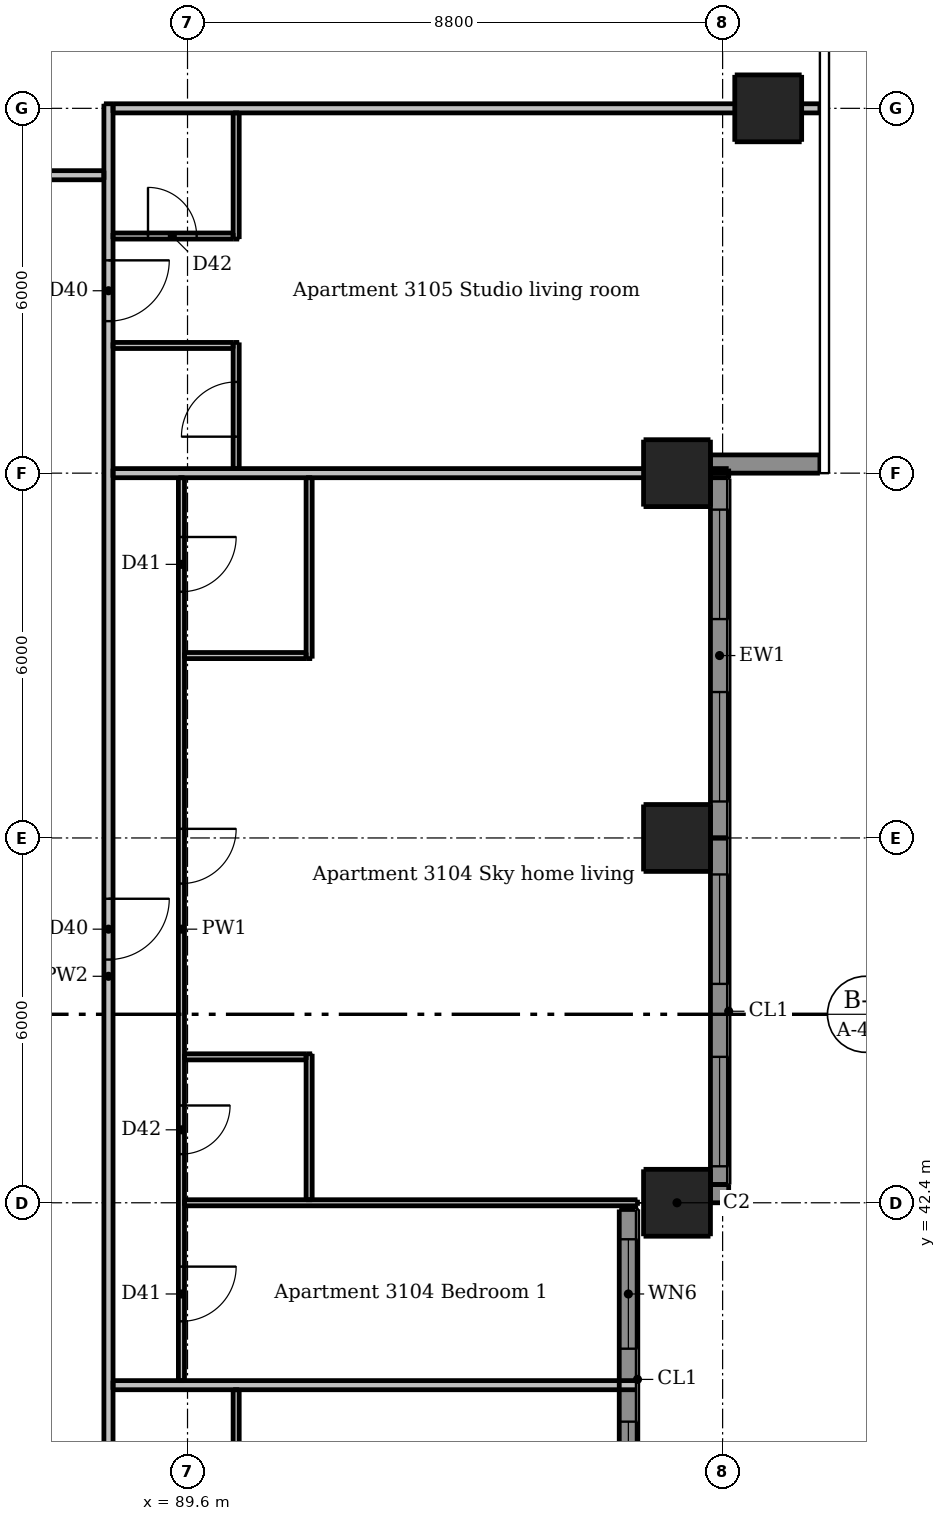
"""IFC4 building model, lengths in metres.
Left out: names, types, materials, properties, quantities, classifications, styles, units other than length and angle.
Written with IfcOpenShell. Run it as: python <this file> out.ifc"""

import sys

from ifc_helpers import new_model, si_unit, direction, frame, frame_2d, origin, origin_2d, place, context, subcontext, project, spatial, rectangle, extrude, element, fill, save


model = new_model("IFC4")
c1 = context("Model", 3, precision=1e-05, world=origin(), true_north=direction((0.0, 1.0)))
c2 = subcontext(c1, "Body", "Model", "MODEL_VIEW")
j1 = project(units=[si_unit("LENGTHUNIT", "METRE"), si_unit("PLANEANGLEUNIT", "RADIAN")], contexts=[c1])
p1 = place(None, origin())
s1 = spatial("IfcSite", under=j1, at=p1, CompositionType="ELEMENT")
p2 = place(p1, origin())
s2 = spatial("IfcBuilding", under=s1, at=p2, CompositionType="ELEMENT")
p3 = place(p2, frame((0.0, 0.0, 115.0)))
s3 = spatial("IfcBuildingStorey", under=s2, at=p3, CompositionType="ELEMENT", Elevation=115.0)
for number, where, z_axis, x_axis in (
    (1, (97.65, 42.4, 0.0), (0.0, 0.0, 1.0), (1.0, 0.0, 0.0)),
    (2, (97.65, 48.4, 0.0), (0.0, 0.0, 1.0), (1.0, 0.0, 0.0)),
    (3, (97.65, 54.4, 0.0), (0.0, 0.0, 1.0), (1.0, 0.0, 0.0)),
    (4, (99.15, 60.4, 0.0), (0.0, 0.0, 1.0), (1.0, 0.0, 0.0)),
):
    element("IfcColumn", number, at=place(p3, frame(where, z_axis=z_axis, x_axis=x_axis)), inside=s3, PredefinedType="COLUMN", context=c2, shape_type="SweptSolid", body=[
        extrude(rectangle(XDim=1.1, YDim=1.1, at=origin_2d()), origin(), (0.0, 0.0, 1.0), 3.05),
    ])
p4 = place(p3, frame((98.2, 42.55, 0.0), z_axis=(0.0, 0.0, 1.0), x_axis=(1.0, 0.0, 0.0)))
e5 = element("IfcWall", 5, at=p4, inside=s3, PredefinedType="SOLIDWALL", context=c2, shape_type="SweptSolid", body=[
    extrude(rectangle(XDim=0.3, YDim=0.3, at=frame_2d((0.15, 0.0))), origin(), (0.0, 0.0, 1.0), 3.05),
])
p5 = place(p3, frame((98.2, 54.55, 0.0), z_axis=(0.0, 0.0, 1.0), x_axis=(1.0, 0.0, 0.0)))
e6 = element("IfcWall", 6, at=p5, inside=s3, PredefinedType="SOLIDWALL", context=c2, shape_type="SweptSolid", body=[
    extrude(rectangle(XDim=1.8, YDim=0.3, at=frame_2d((0.9, 0.0))), origin(), (0.0, 0.0, 1.0), 3.05),
])
p6 = place(p3, frame((96.85, 36.7, 0.0), z_axis=(0.0, 0.0, 1.0), x_axis=(0.0, 1.0, 0.0)))
e7 = element("IfcWall", 7, at=p6, inside=s3, PredefinedType="SOLIDWALL", context=c2, shape_type="SweptSolid", body=[
    extrude(rectangle(XDim=5.59, YDim=0.3, at=frame_2d((2.795, 0.0))), origin(), (0.0, 0.0, 1.0), 3.05),
])
p7 = place(p6, frame((0.3, 0.0, 0.15)))
e8 = element("IfcOpeningElement", 8, at=p7, cuts=e7, PredefinedType="OPENING", context=c2, shape_type="SweptSolid", body=[
    extrude(rectangle(XDim=1.8, YDim=2.1, at=frame_2d((0.9, 1.05))), frame((0.0, 0.16, 0.0), z_axis=(0.0, -1.0, 0.0), x_axis=(1.0, 0.0, 0.0)), (0.0, 0.0, 1.0), 0.32),
])
p8 = place(p6, frame((3.3, 0.0, 0.15)))
e9 = element("IfcOpeningElement", 9, at=p8, cuts=e7, PredefinedType="OPENING", context=c2, shape_type="SweptSolid", body=[
    extrude(rectangle(XDim=1.8, YDim=2.1, at=frame_2d((0.9, 1.05))), frame((0.0, 0.16, 0.0), z_axis=(0.0, -1.0, 0.0), x_axis=(1.0, 0.0, 0.0)), (0.0, 0.0, 1.0), 0.32),
])
p9 = place(p3, frame((98.35, 42.7, 0.0), z_axis=(0.0, 0.0, 1.0), x_axis=(0.0, 1.0, 0.0)))
e10 = element("IfcWall", 10, at=p9, inside=s3, PredefinedType="SOLIDWALL", context=c2, shape_type="SweptSolid", body=[
    extrude(rectangle(XDim=5.7, YDim=0.3, at=frame_2d((2.85, 0.0))), origin(), (0.0, 0.0, 1.0), 3.05),
])
p10 = place(p9, frame((0.3, 0.0, 0.15)))
e11 = element("IfcOpeningElement", 11, at=p10, cuts=e10, PredefinedType="OPENING", context=c2, shape_type="SweptSolid", body=[
    extrude(rectangle(XDim=1.8, YDim=2.1, at=frame_2d((0.9, 1.05))), frame((0.0, 0.16, 0.0), z_axis=(0.0, -1.0, 0.0), x_axis=(1.0, 0.0, 0.0)), (0.0, 0.0, 1.0), 0.32),
])
p11 = place(p9, frame((3.3, 0.0, 0.15)))
e12 = element("IfcOpeningElement", 12, at=p11, cuts=e10, PredefinedType="OPENING", context=c2, shape_type="SweptSolid", body=[
    extrude(rectangle(XDim=1.8, YDim=2.1, at=frame_2d((0.9, 1.05))), frame((0.0, 0.16, 0.0), z_axis=(0.0, -1.0, 0.0), x_axis=(1.0, 0.0, 0.0)), (0.0, 0.0, 1.0), 0.32),
])
p12 = place(p3, frame((98.35, 48.4, 0.0), z_axis=(0.0, 0.0, 1.0), x_axis=(0.0, 1.0, 0.0)))
e13 = element("IfcWall", 13, at=p12, inside=s3, PredefinedType="SOLIDWALL", context=c2, shape_type="SweptSolid", body=[
    extrude(rectangle(XDim=6.0, YDim=0.3, at=frame_2d((3.0, 0.0))), origin(), (0.0, 0.0, 1.0), 3.05),
])
p13 = place(p12, frame((0.6, 0.0, 0.15)))
e14 = element("IfcOpeningElement", 14, at=p13, cuts=e13, PredefinedType="OPENING", context=c2, shape_type="SweptSolid", body=[
    extrude(rectangle(XDim=1.8, YDim=2.1, at=frame_2d((0.9, 1.05))), frame((0.0, 0.16, 0.0), z_axis=(0.0, -1.0, 0.0), x_axis=(1.0, 0.0, 0.0)), (0.0, 0.0, 1.0), 0.32),
])
p14 = place(p12, frame((3.6, 0.0, 0.15)))
e15 = element("IfcOpeningElement", 15, at=p14, cuts=e13, PredefinedType="OPENING", context=c2, shape_type="SweptSolid", body=[
    extrude(rectangle(XDim=1.8, YDim=2.1, at=frame_2d((0.9, 1.05))), frame((0.0, 0.16, 0.0), z_axis=(0.0, -1.0, 0.0), x_axis=(1.0, 0.0, 0.0)), (0.0, 0.0, 1.0), 0.32),
])
p15 = place(p3, frame((89.5, 54.325, 0.0), z_axis=(0.0, 0.0, 1.0), x_axis=(0.0, -1.0, 0.0)))
e16 = element("IfcWall", 16, at=p15, inside=s3, PredefinedType="PARTITIONING", context=c2, shape_type="SweptSolid", body=[
    extrude(rectangle(XDim=14.85, YDim=0.1, at=frame_2d((7.425, 0.0))), origin(), (0.0, 0.0, 1.0), 3.05),
])
p16 = place(p15, frame((5.775, 0.0, 0.0)))
e17 = element("IfcOpeningElement", 17, at=p16, cuts=e16, PredefinedType="OPENING", context=c2, shape_type="SweptSolid", body=[
    extrude(rectangle(XDim=0.9, YDim=2.1, at=frame_2d((0.45, 1.05))), frame((0.0, 0.06, 0.0), z_axis=(0.0, -1.0, 0.0), x_axis=(1.0, 0.0, 0.0)), (0.0, 0.0, 1.0), 0.12),
])
p17 = place(p15, frame((0.975, 0.0, 0.0)))
e18 = element("IfcOpeningElement", 18, at=p17, cuts=e16, PredefinedType="OPENING", context=c2, shape_type="SweptSolid", body=[
    extrude(rectangle(XDim=0.9, YDim=2.1, at=frame_2d((0.45, 1.05))), frame((0.0, 0.06, 0.0), z_axis=(0.0, -1.0, 0.0), x_axis=(1.0, 0.0, 0.0)), (0.0, 0.0, 1.0), 0.12),
])
p18 = place(p15, frame((12.975, 0.0, 0.0)))
e19 = element("IfcOpeningElement", 19, at=p18, cuts=e16, PredefinedType="OPENING", context=c2, shape_type="SweptSolid", body=[
    extrude(rectangle(XDim=0.9, YDim=2.1, at=frame_2d((0.45, 1.05))), frame((0.0, 0.06, 0.0), z_axis=(0.0, -1.0, 0.0), x_axis=(1.0, 0.0, 0.0)), (0.0, 0.0, 1.0), 0.12),
])
p19 = place(p15, frame((10.325, 0.0, 0.0)))
e20 = element("IfcOpeningElement", 20, at=p19, cuts=e16, PredefinedType="OPENING", context=c2, shape_type="SweptSolid", body=[
    extrude(rectangle(XDim=0.8, YDim=2.1, at=frame_2d((0.4, 1.05))), frame((0.0, 0.06, 0.0), z_axis=(0.0, -1.0, 0.0), x_axis=(1.0, 0.0, 0.0)), (0.0, 0.0, 1.0), 0.12),
])
p20 = place(p3, frame((90.4, 33.45, 0.0), z_axis=(0.0, 0.0, 1.0), x_axis=(0.0, 1.0, 0.0)))
e21 = element("IfcWall", 21, at=p20, inside=s3, PredefinedType="PARTITIONING", context=c2, shape_type="SweptSolid", body=[
    extrude(rectangle(XDim=5.875, YDim=0.1, at=frame_2d((2.938, 0.0))), origin(), (0.0, 0.0, 1.0), 3.05),
])
p21 = place(p20, frame((3.75, 0.0, 0.0)))
e22 = element("IfcOpeningElement", 22, at=p21, cuts=e21, PredefinedType="OPENING", context=c2, shape_type="SweptSolid", body=[
    extrude(rectangle(XDim=0.8, YDim=2.1, at=frame_2d((0.4, 1.05))), frame((0.0, 0.06, 0.0), z_axis=(0.0, -1.0, 0.0), x_axis=(1.0, 0.0, 0.0)), (0.0, 0.0, 1.0), 0.12),
])
p22 = place(p3, frame((90.4, 54.475, 0.0), z_axis=(0.0, 0.0, 1.0), x_axis=(0.0, 1.0, 0.0)))
e23 = element("IfcWall", 23, at=p22, inside=s3, PredefinedType="PARTITIONING", context=c2, shape_type="SweptSolid", body=[
    extrude(rectangle(XDim=2.075, YDim=0.1, at=frame_2d((1.038, 0.0))), origin(), (0.0, 0.0, 1.0), 3.05),
])
p23 = place(p22, frame((0.525, 0.0, 0.0)))
e24 = element("IfcOpeningElement", 24, at=p23, cuts=e23, PredefinedType="OPENING", context=c2, shape_type="SweptSolid", body=[
    extrude(rectangle(XDim=0.9, YDim=2.1, at=frame_2d((0.45, 1.05))), frame((0.0, 0.06, 0.0), z_axis=(0.0, -1.0, 0.0), x_axis=(1.0, 0.0, 0.0)), (0.0, 0.0, 1.0), 0.12),
])
p24 = place(p3, frame((90.4, 58.25, 0.0), z_axis=(0.0, 0.0, 1.0), x_axis=(0.0, 1.0, 0.0)))
e25 = element("IfcWall", 25, at=p24, inside=s3, PredefinedType="PARTITIONING", context=c2, shape_type="SweptSolid", body=[
    extrude(rectangle(XDim=2.075, YDim=0.1, at=frame_2d((1.038, 0.0))), origin(), (0.0, 0.0, 1.0), 3.05),
])
p25 = place(p3, frame((91.6, 42.45, 0.0), z_axis=(0.0, 0.0, 1.0), x_axis=(0.0, 1.0, 0.0)))
e26 = element("IfcWall", 26, at=p25, inside=s3, PredefinedType="PARTITIONING", context=c2, shape_type="SweptSolid", body=[
    extrude(rectangle(XDim=2.4, YDim=0.1, at=frame_2d((1.2, 0.0))), origin(), (0.0, 0.0, 1.0), 3.05),
])
p26 = place(p3, frame((91.6, 51.35, 0.0), z_axis=(0.0, 0.0, 1.0), x_axis=(0.0, 1.0, 0.0)))
e27 = element("IfcWall", 27, at=p26, inside=s3, PredefinedType="PARTITIONING", context=c2, shape_type="SweptSolid", body=[
    extrude(rectangle(XDim=2.975, YDim=0.1, at=frame_2d((1.487, 0.0))), origin(), (0.0, 0.0, 1.0), 3.05),
])
p27 = place(p3, frame((88.375, 58.3, 0.0), z_axis=(0.0, 0.0, 1.0), x_axis=(1.0, 0.0, 0.0)))
e28 = element("IfcWall", 28, at=p27, inside=s3, PredefinedType="PARTITIONING", context=c2, shape_type="SweptSolid", body=[
    extrude(rectangle(XDim=1.975, YDim=0.1, at=frame_2d((0.988, 0.0))), origin(), (0.0, 0.0, 1.0), 3.05),
])
p28 = place(p27, frame((0.575, 0.0, 0.0)))
e29 = element("IfcOpeningElement", 29, at=p28, cuts=e28, PredefinedType="OPENING", context=c2, shape_type="SweptSolid", body=[
    extrude(rectangle(XDim=0.8, YDim=2.1, at=frame_2d((0.4, 1.05))), frame((0.0, 0.06, 0.0), z_axis=(0.0, -1.0, 0.0), x_axis=(1.0, 0.0, 0.0)), (0.0, 0.0, 1.0), 0.12),
])
p29 = place(p3, frame((88.375, 56.5, 0.0), z_axis=(0.0, 0.0, 1.0), x_axis=(1.0, 0.0, 0.0)))
e30 = element("IfcWall", 30, at=p29, inside=s3, PredefinedType="PARTITIONING", context=c2, shape_type="SweptSolid", body=[
    extrude(rectangle(XDim=1.975, YDim=0.1, at=frame_2d((0.988, 0.0))), origin(), (0.0, 0.0, 1.0), 3.05),
])
for number, where, z_axis, x_axis in (
    (31, (89.55, 51.4, 0.0), (0.0, 0.0, 1.0), (1.0, 0.0, 0.0)),
    (32, (89.55, 44.8, 0.0), (0.0, 0.0, 1.0), (1.0, 0.0, 0.0)),
):
    element("IfcWall", number, at=place(p3, frame(where, z_axis=z_axis, x_axis=x_axis)), inside=s3, PredefinedType="PARTITIONING", context=c2, shape_type="SweptSolid", body=[
        extrude(rectangle(XDim=2.0, YDim=0.1, at=frame_2d((1.0, 0.0))), origin(), (0.0, 0.0, 1.0), 3.05),
    ])
p30 = place(p3, frame((89.55, 42.4, 0.0), z_axis=(0.0, 0.0, 1.0), x_axis=(1.0, 0.0, 0.0)))
e33 = element("IfcWall", 33, at=p30, inside=s3, PredefinedType="PARTITIONING", context=c2, shape_type="SweptSolid", body=[
    extrude(rectangle(XDim=7.45, YDim=0.1, at=frame_2d((3.725, 0.0))), origin(), (0.0, 0.0, 1.0), 2.516),
])
p31 = place(p3, frame((88.3, 60.475, 0.0), z_axis=(0.0, 0.0, 1.0), x_axis=(0.0, -1.0, 0.0)))
e34 = element("IfcWall", 34, at=p31, inside=s3, PredefinedType="PARTITIONING", context=c2, shape_type="SweptSolid", body=[
    extrude(rectangle(XDim=28.7, YDim=0.15, at=frame_2d((14.35, 0.0))), origin(), (0.0, 0.0, 1.0), 3.05),
])
p32 = place(p31, frame((27.425, 0.0, 0.0)))
e35 = element("IfcOpeningElement", 35, at=p32, cuts=e34, PredefinedType="OPENING", context=c2, shape_type="SweptSolid", body=[
    extrude(rectangle(XDim=1.0, YDim=2.1, at=frame_2d((0.5, 1.05))), frame((0.0, 0.085, 0.0), z_axis=(0.0, -1.0, 0.0), x_axis=(1.0, 0.0, 0.0)), (0.0, 0.0, 1.0), 0.17),
])
p33 = place(p31, frame((13.075, 0.0, 0.0)))
e36 = element("IfcOpeningElement", 36, at=p33, cuts=e34, PredefinedType="OPENING", context=c2, shape_type="SweptSolid", body=[
    extrude(rectangle(XDim=1.0, YDim=2.1, at=frame_2d((0.5, 1.05))), frame((0.0, 0.085, 0.0), z_axis=(0.0, -1.0, 0.0), x_axis=(1.0, 0.0, 0.0)), (0.0, 0.0, 1.0), 0.17),
])
p34 = place(p31, frame((2.575, 0.0, 0.0)))
e37 = element("IfcOpeningElement", 37, at=p34, cuts=e34, PredefinedType="OPENING", context=c2, shape_type="SweptSolid", body=[
    extrude(rectangle(XDim=1.0, YDim=2.1, at=frame_2d((0.5, 1.05))), frame((0.0, 0.085, 0.0), z_axis=(0.0, -1.0, 0.0), x_axis=(1.0, 0.0, 0.0)), (0.0, 0.0, 1.0), 0.17),
])
p35 = place(p3, frame((88.375, 60.4, 0.0), z_axis=(0.0, 0.0, 1.0), x_axis=(1.0, 0.0, 0.0)))
e38 = element("IfcWall", 38, at=p35, inside=s3, PredefinedType="PARTITIONING", context=c2, shape_type="SweptSolid", body=[
    extrude(rectangle(XDim=11.625, YDim=0.15, at=frame_2d((5.812, 0.0))), origin(), (0.0, 0.0, 1.0), 2.516),
])
p36 = place(p3, frame((59.675, 59.3, 0.0), z_axis=(0.0, 0.0, 1.0), x_axis=(1.0, 0.0, 0.0)))
e39 = element("IfcWall", 39, at=p36, inside=s3, PredefinedType="PARTITIONING", context=c2, shape_type="SweptSolid", body=[
    extrude(rectangle(XDim=28.55, YDim=0.15, at=frame_2d((14.275, 0.0))), origin(), (0.0, 0.0, 1.0), 3.05),
])
p37 = place(p36, frame((8.975, 0.0, 0.0)))
e40 = element("IfcOpeningElement", 40, at=p37, cuts=e39, PredefinedType="OPENING", context=c2, shape_type="SweptSolid", body=[
    extrude(rectangle(XDim=1.0, YDim=2.1, at=frame_2d((0.5, 1.05))), frame((0.0, 0.085, 0.0), z_axis=(0.0, -1.0, 0.0), x_axis=(1.0, 0.0, 0.0)), (0.0, 0.0, 1.0), 0.17),
])
p38 = place(p36, frame((25.775, 0.0, 0.0)))
e41 = element("IfcOpeningElement", 41, at=p38, cuts=e39, PredefinedType="OPENING", context=c2, shape_type="SweptSolid", body=[
    extrude(rectangle(XDim=1.0, YDim=2.1, at=frame_2d((0.5, 1.05))), frame((0.0, 0.085, 0.0), z_axis=(0.0, -1.0, 0.0), x_axis=(1.0, 0.0, 0.0)), (0.0, 0.0, 1.0), 0.17),
])
p39 = place(p3, frame((88.375, 54.4, 0.0), z_axis=(0.0, 0.0, 1.0), x_axis=(1.0, 0.0, 0.0)))
e42 = element("IfcWall", 42, at=p39, inside=s3, PredefinedType="PARTITIONING", context=c2, shape_type="SweptSolid", body=[
    extrude(rectangle(XDim=10.125, YDim=0.15, at=frame_2d((5.062, 0.0))), origin(), (0.0, 0.0, 1.0), 2.516),
])
p40 = place(p3, frame((88.375, 39.4, 0.0), z_axis=(0.0, 0.0, 1.0), x_axis=(1.0, 0.0, 0.0)))
e43 = element("IfcWall", 43, at=p40, inside=s3, PredefinedType="PARTITIONING", context=c2, shape_type="SweptSolid", body=[
    extrude(rectangle(XDim=8.625, YDim=0.15, at=frame_2d((4.312, 0.0))), origin(), (0.0, 0.0, 1.0), 3.05),
])
p41 = place(p7, origin())
e44 = element("IfcWindow", 44, at=p41, inside=s3, PartitioningType="DOUBLE_PANEL_VERTICAL", PredefinedType="WINDOW", context=c2, shape_type="SweptSolid", body=[
    extrude(rectangle(XDim=1.8, YDim=2.1, at=frame_2d((0.9, 1.05))), frame((0.0, 0.03, 0.0), z_axis=(0.0, -1.0, 0.0), x_axis=(1.0, 0.0, 0.0)), (0.0, 0.0, 1.0), 0.06),
])
fill(e8, e44)
p42 = place(p8, origin())
e45 = element("IfcWindow", 45, at=p42, inside=s3, PartitioningType="DOUBLE_PANEL_VERTICAL", PredefinedType="WINDOW", context=c2, shape_type="SweptSolid", body=[
    extrude(rectangle(XDim=1.8, YDim=2.1, at=frame_2d((0.9, 1.05))), frame((0.0, 0.03, 0.0), z_axis=(0.0, -1.0, 0.0), x_axis=(1.0, 0.0, 0.0)), (0.0, 0.0, 1.0), 0.06),
])
fill(e9, e45)
p43 = place(p10, origin())
e46 = element("IfcWindow", 46, at=p43, inside=s3, PartitioningType="DOUBLE_PANEL_VERTICAL", PredefinedType="WINDOW", context=c2, shape_type="SweptSolid", body=[
    extrude(rectangle(XDim=1.8, YDim=2.1, at=frame_2d((0.9, 1.05))), frame((0.0, 0.03, 0.0), z_axis=(0.0, -1.0, 0.0), x_axis=(1.0, 0.0, 0.0)), (0.0, 0.0, 1.0), 0.06),
])
fill(e11, e46)
p44 = place(p11, origin())
e47 = element("IfcWindow", 47, at=p44, inside=s3, PartitioningType="DOUBLE_PANEL_VERTICAL", PredefinedType="WINDOW", context=c2, shape_type="SweptSolid", body=[
    extrude(rectangle(XDim=1.8, YDim=2.1, at=frame_2d((0.9, 1.05))), frame((0.0, 0.03, 0.0), z_axis=(0.0, -1.0, 0.0), x_axis=(1.0, 0.0, 0.0)), (0.0, 0.0, 1.0), 0.06),
])
fill(e12, e47)
p45 = place(p13, origin())
e48 = element("IfcWindow", 48, at=p45, inside=s3, PartitioningType="DOUBLE_PANEL_VERTICAL", PredefinedType="WINDOW", context=c2, shape_type="SweptSolid", body=[
    extrude(rectangle(XDim=1.8, YDim=2.1, at=frame_2d((0.9, 1.05))), frame((0.0, 0.03, 0.0), z_axis=(0.0, -1.0, 0.0), x_axis=(1.0, 0.0, 0.0)), (0.0, 0.0, 1.0), 0.06),
])
fill(e14, e48)
p46 = place(p14, origin())
e49 = element("IfcWindow", 49, at=p46, inside=s3, PartitioningType="DOUBLE_PANEL_VERTICAL", PredefinedType="WINDOW", context=c2, shape_type="SweptSolid", body=[
    extrude(rectangle(XDim=1.8, YDim=2.1, at=frame_2d((0.9, 1.05))), frame((0.0, 0.03, 0.0), z_axis=(0.0, -1.0, 0.0), x_axis=(1.0, 0.0, 0.0)), (0.0, 0.0, 1.0), 0.06),
])
fill(e15, e49)
p47 = place(p33, origin())
e50 = element("IfcDoor", 50, at=p47, inside=s3, OperationType="SINGLE_SWING_LEFT", PredefinedType="DOOR", context=c2, shape_type="SweptSolid", body=[
    extrude(rectangle(XDim=1.0, YDim=2.1, at=frame_2d((0.5, 1.05))), frame((0.0, 0.025, 0.0), z_axis=(0.0, -1.0, 0.0), x_axis=(1.0, 0.0, 0.0)), (0.0, 0.0, 1.0), 0.05),
])
fill(e36, e50)
p48 = place(p16, origin())
e51 = element("IfcDoor", 51, at=p48, inside=s3, OperationType="SINGLE_SWING_LEFT", PredefinedType="DOOR", context=c2, shape_type="SweptSolid", body=[
    extrude(rectangle(XDim=0.9, YDim=2.1, at=frame_2d((0.45, 1.05))), frame((0.0, 0.025, 0.0), z_axis=(0.0, -1.0, 0.0), x_axis=(1.0, 0.0, 0.0)), (0.0, 0.0, 1.0), 0.05),
])
fill(e17, e51)
p49 = place(p17, origin())
e52 = element("IfcDoor", 52, at=p49, inside=s3, OperationType="SINGLE_SWING_LEFT", PredefinedType="DOOR", context=c2, shape_type="SweptSolid", body=[
    extrude(rectangle(XDim=0.9, YDim=2.1, at=frame_2d((0.45, 1.05))), frame((0.0, 0.025, 0.0), z_axis=(0.0, -1.0, 0.0), x_axis=(1.0, 0.0, 0.0)), (0.0, 0.0, 1.0), 0.05),
])
fill(e18, e52)
p50 = place(p18, origin())
e53 = element("IfcDoor", 53, at=p50, inside=s3, OperationType="SINGLE_SWING_LEFT", PredefinedType="DOOR", context=c2, shape_type="SweptSolid", body=[
    extrude(rectangle(XDim=0.9, YDim=2.1, at=frame_2d((0.45, 1.05))), frame((0.0, 0.025, 0.0), z_axis=(0.0, -1.0, 0.0), x_axis=(1.0, 0.0, 0.0)), (0.0, 0.0, 1.0), 0.05),
])
fill(e19, e53)
p51 = place(p19, origin())
e54 = element("IfcDoor", 54, at=p51, inside=s3, OperationType="SINGLE_SWING_LEFT", PredefinedType="DOOR", context=c2, shape_type="SweptSolid", body=[
    extrude(rectangle(XDim=0.8, YDim=2.1, at=frame_2d((0.4, 1.05))), frame((0.0, 0.025, 0.0), z_axis=(0.0, -1.0, 0.0), x_axis=(1.0, 0.0, 0.0)), (0.0, 0.0, 1.0), 0.05),
])
fill(e20, e54)
p52 = place(p34, origin())
e55 = element("IfcDoor", 55, at=p52, inside=s3, OperationType="SINGLE_SWING_LEFT", PredefinedType="DOOR", context=c2, shape_type="SweptSolid", body=[
    extrude(rectangle(XDim=1.0, YDim=2.1, at=frame_2d((0.5, 1.05))), frame((0.0, 0.025, 0.0), z_axis=(0.0, -1.0, 0.0), x_axis=(1.0, 0.0, 0.0)), (0.0, 0.0, 1.0), 0.05),
])
fill(e37, e55)
p53 = place(p23, origin())
e56 = element("IfcDoor", 56, at=p53, inside=s3, OperationType="SINGLE_SWING_LEFT", PredefinedType="DOOR", context=c2, shape_type="SweptSolid", body=[
    extrude(rectangle(XDim=0.9, YDim=2.1, at=frame_2d((0.45, 1.05))), frame((0.0, 0.025, 0.0), z_axis=(0.0, -1.0, 0.0), x_axis=(1.0, 0.0, 0.0)), (0.0, 0.0, 1.0), 0.05),
])
fill(e24, e56)
p54 = place(p28, origin())
e57 = element("IfcDoor", 57, at=p54, inside=s3, OperationType="SINGLE_SWING_LEFT", PredefinedType="DOOR", context=c2, shape_type="SweptSolid", body=[
    extrude(rectangle(XDim=0.8, YDim=2.1, at=frame_2d((0.4, 1.05))), frame((0.0, 0.025, 0.0), z_axis=(0.0, -1.0, 0.0), x_axis=(1.0, 0.0, 0.0)), (0.0, 0.0, 1.0), 0.05),
])
fill(e29, e57)
save(model, sys.argv[1])
